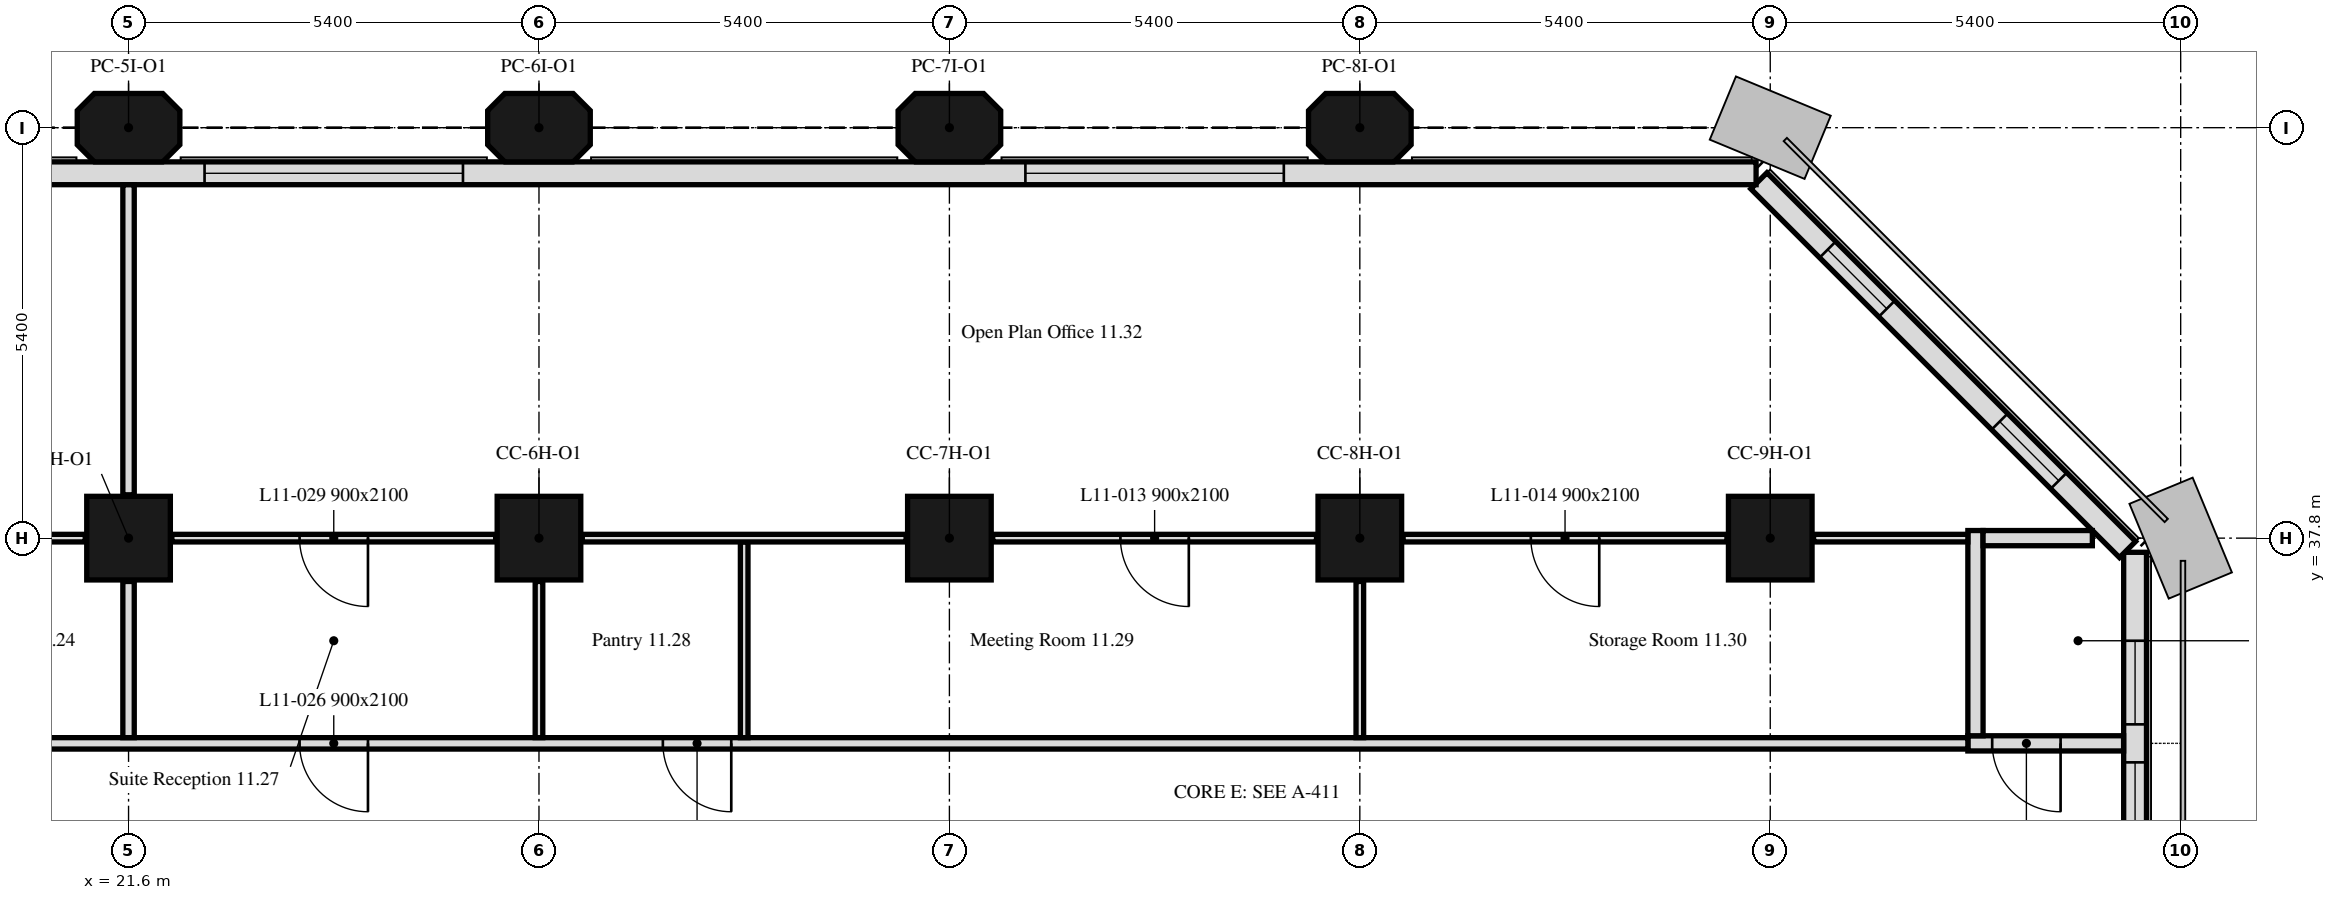
"""IFC4 building model, lengths in metres.
Left out: names, types, materials, properties, quantities, classifications, styles, units other than length and angle.
Written with IfcOpenShell. Run it as: python <this file> out.ifc"""

import sys

from ifc_helpers import new_model, si_unit, direction, frame, frame_2d, origin, origin_2d, place, context, subcontext, project, spatial, polyline, rectangle, outline, extrude, element, fill, save


model = new_model("IFC4")
c1 = context("Model", 3, precision=1e-05, world=origin(), true_north=direction((0.0, 1.0)))
c2 = subcontext(c1, "Body", "Model", "MODEL_VIEW")
j1 = project(units=[si_unit("LENGTHUNIT", "METRE"), si_unit("PLANEANGLEUNIT", "RADIAN")], contexts=[c1])
p1 = place(None, origin())
s1 = spatial("IfcSite", under=j1, at=p1, CompositionType="ELEMENT")
p2 = place(p1, origin())
s2 = spatial("IfcBuilding", under=s1, at=p2, CompositionType="ELEMENT")
p3 = place(p2, frame((0.0, 0.0, 52.6)))
s3 = spatial("IfcBuildingStorey", under=s2, at=p3, CompositionType="ELEMENT", Elevation=52.6)
for number, where, z_axis, x_axis in (
    (1, (21.6, 37.8, 0.0), (0.0, 0.0, 1.0), (1.0, 0.0, 0.0)),
    (2, (27.0, 37.8, 0.0), (0.0, 0.0, 1.0), (1.0, 0.0, 0.0)),
    (3, (32.4, 37.8, 0.0), (0.0, 0.0, 1.0), (1.0, 0.0, 0.0)),
    (4, (37.8, 37.8, 0.0), (0.0, 0.0, 1.0), (1.0, 0.0, 0.0)),
    (5, (43.2, 37.8, 0.0), (0.0, 0.0, 1.0), (1.0, 0.0, 0.0)),
):
    element("IfcColumn", number, at=place(p3, frame(where, z_axis=z_axis, x_axis=x_axis)), inside=s3, PredefinedType="COLUMN", context=c2, shape_type="SweptSolid", body=[
        extrude(rectangle(XDim=1.1, YDim=1.1, at=origin_2d()), origin(), (0.0, 0.0, 1.0), 3.5),
    ])
for number, where, z_axis, x_axis in (
    (6, (21.6, 43.2, 0.0), (0.0, 0.0, 1.0), (1.0, 0.0, 0.0)),
    (7, (27.0, 43.2, 0.0), (0.0, 0.0, 1.0), (1.0, 0.0, 0.0)),
    (8, (32.4, 43.2, 0.0), (0.0, 0.0, 1.0), (1.0, 0.0, 0.0)),
    (9, (37.8, 43.2, 0.0), (0.0, 0.0, 1.0), (1.0, 0.0, 0.0)),
):
    element("IfcColumn", number, at=place(p3, frame(where, z_axis=z_axis, x_axis=x_axis)), inside=s3, PredefinedType="COLUMN", context=c2, shape_type="SweptSolid", body=[
        extrude(outline(polyline([(-0.45, -0.45), (0.45, -0.45), (0.675, -0.225), (0.675, 0.225), (0.45, 0.45), (-0.45, 0.45), (-0.675, 0.225), (-0.675, -0.225), (-0.45, -0.45)])), origin(), (0.0, 0.0, 1.0), 3.5),
    ])
p4 = place(p3, frame((48.0, 5.586, 0.0), z_axis=(0.0, 0.0, 1.0), x_axis=(0.0, 1.0, 0.0)))
e10 = element("IfcWall", 10, at=p4, inside=s3, PredefinedType="SOLIDWALL", context=c2, shape_type="SweptSolid", body=[
    extrude(rectangle(XDim=32.027, YDim=0.3, at=frame_2d((16.014, 0.0))), origin(), (0.0, 0.0, 1.0), 3.5),
])
p5 = place(p4, frame((6.564, 0.0, 0.9)))
e11 = element("IfcOpeningElement", 11, at=p5, cuts=e10, PredefinedType="OPENING", context=c2, shape_type="SweptSolid", body=[
    extrude(rectangle(XDim=1.1, YDim=1.7, at=frame_2d((0.55, 0.85))), frame((0.0, 0.16, 0.0), z_axis=(0.0, -1.0, 0.0), x_axis=(1.0, 0.0, 0.0)), (0.0, 0.0, 1.0), 0.32),
])
p6 = place(p4, frame((8.164, 0.0, 0.9)))
e12 = element("IfcOpeningElement", 12, at=p6, cuts=e10, PredefinedType="OPENING", context=c2, shape_type="SweptSolid", body=[
    extrude(rectangle(XDim=1.1, YDim=1.7, at=frame_2d((0.55, 0.85))), frame((0.0, 0.16, 0.0), z_axis=(0.0, -1.0, 0.0), x_axis=(1.0, 0.0, 0.0)), (0.0, 0.0, 1.0), 0.32),
])
p7 = place(p4, frame((17.014, 0.0, 0.9)))
e13 = element("IfcOpeningElement", 13, at=p7, cuts=e10, PredefinedType="OPENING", context=c2, shape_type="SweptSolid", body=[
    extrude(rectangle(XDim=3.4, YDim=1.7, at=frame_2d((1.7, 0.85))), frame((0.0, 0.16, 0.0), z_axis=(0.0, -1.0, 0.0), x_axis=(1.0, 0.0, 0.0)), (0.0, 0.0, 1.0), 0.32),
])
p8 = place(p4, frame((28.164, 0.0, 0.9)))
e14 = element("IfcOpeningElement", 14, at=p8, cuts=e10, PredefinedType="OPENING", context=c2, shape_type="SweptSolid", body=[
    extrude(rectangle(XDim=1.1, YDim=1.7, at=frame_2d((0.55, 0.85))), frame((0.0, 0.16, 0.0), z_axis=(0.0, -1.0, 0.0), x_axis=(1.0, 0.0, 0.0)), (0.0, 0.0, 1.0), 0.32),
])
p9 = place(p4, frame((29.764, 0.0, 0.9)))
e15 = element("IfcOpeningElement", 15, at=p9, cuts=e10, PredefinedType="OPENING", context=c2, shape_type="SweptSolid", body=[
    extrude(rectangle(XDim=1.1, YDim=1.7, at=frame_2d((0.55, 0.85))), frame((0.0, 0.16, 0.0), z_axis=(0.0, -1.0, 0.0), x_axis=(1.0, 0.0, 0.0)), (0.0, 0.0, 1.0), 0.32),
])
p10 = place(p3, frame((47.901, 37.65, 0.0), z_axis=(0.0, 0.0, 1.0), x_axis=(-0.707106781187, 0.707106781187, 0.0)))
e16 = element("IfcWall", 16, at=p10, inside=s3, PredefinedType="SOLIDWALL", context=c2, shape_type="SweptSolid", body=[
    extrude(rectangle(XDim=6.86, YDim=0.3, at=frame_2d((3.43, 0.0))), origin(), (0.0, 0.0, 1.0), 3.5),
])
p11 = place(p10, frame((1.28, 0.0, 0.9)))
e17 = element("IfcOpeningElement", 17, at=p11, cuts=e16, PredefinedType="OPENING", context=c2, shape_type="SweptSolid", body=[
    extrude(rectangle(XDim=1.1, YDim=1.7, at=frame_2d((0.55, 0.85))), frame((0.0, 0.16, 0.0), z_axis=(0.0, -1.0, 0.0), x_axis=(1.0, 0.0, 0.0)), (0.0, 0.0, 1.0), 0.32),
])
p12 = place(p10, frame((4.48, 0.0, 0.9)))
e18 = element("IfcOpeningElement", 18, at=p12, cuts=e16, PredefinedType="OPENING", context=c2, shape_type="SweptSolid", body=[
    extrude(rectangle(XDim=1.1, YDim=1.7, at=frame_2d((0.55, 0.85))), frame((0.0, 0.16, 0.0), z_axis=(0.0, -1.0, 0.0), x_axis=(1.0, 0.0, 0.0)), (0.0, 0.0, 1.0), 0.32),
])
p13 = place(p3, frame((43.014, 42.6, 0.0), z_axis=(0.0, 0.0, 1.0), x_axis=(-1.0, 0.0, 0.0)))
e19 = element("IfcWall", 19, at=p13, inside=s3, PredefinedType="SOLIDWALL", context=c2, shape_type="SweptSolid", body=[
    extrude(rectangle(XDim=32.027, YDim=0.3, at=frame_2d((16.014, 0.0))), origin(), (0.0, 0.0, 1.0), 3.5),
])
p14 = place(p13, frame((6.214, 0.0, 0.9)))
e20 = element("IfcOpeningElement", 20, at=p14, cuts=e19, PredefinedType="OPENING", context=c2, shape_type="SweptSolid", body=[
    extrude(rectangle(XDim=3.4, YDim=1.7, at=frame_2d((1.7, 0.85))), frame((0.0, 0.16, 0.0), z_axis=(0.0, -1.0, 0.0), x_axis=(1.0, 0.0, 0.0)), (0.0, 0.0, 1.0), 0.32),
])
p15 = place(p13, frame((17.014, 0.0, 0.9)))
e21 = element("IfcOpeningElement", 21, at=p15, cuts=e19, PredefinedType="OPENING", context=c2, shape_type="SweptSolid", body=[
    extrude(rectangle(XDim=3.4, YDim=1.7, at=frame_2d((1.7, 0.85))), frame((0.0, 0.16, 0.0), z_axis=(0.0, -1.0, 0.0), x_axis=(1.0, 0.0, 0.0)), (0.0, 0.0, 1.0), 0.32),
])
p16 = place(p13, frame((27.814, 0.0, 0.9)))
e22 = element("IfcOpeningElement", 22, at=p16, cuts=e19, PredefinedType="OPENING", context=c2, shape_type="SweptSolid", body=[
    extrude(rectangle(XDim=3.4, YDim=1.7, at=frame_2d((1.7, 0.85))), frame((0.0, 0.16, 0.0), z_axis=(0.0, -1.0, 0.0), x_axis=(1.0, 0.0, 0.0)), (0.0, 0.0, 1.0), 0.32),
])
p17 = place(p3, frame((47.849, 35.1, 0.0), z_axis=(0.0, 0.0, 1.0), x_axis=(-1.0, 0.0, 0.0)))
e23 = element("IfcWall", 23, at=p17, inside=s3, PredefinedType="PARTITIONING", context=c2, shape_type="SweptSolid", body=[
    extrude(rectangle(XDim=2.049, YDim=0.2, at=frame_2d((1.024, 0.0))), origin(), (0.0, 0.0, 1.0), 3.5),
])
p18 = place(p17, frame((0.829, 0.0, 0.0)))
e24 = element("IfcOpeningElement", 24, at=p18, cuts=e23, PredefinedType="OPENING", context=c2, shape_type="SweptSolid", body=[
    extrude(rectangle(XDim=0.9, YDim=2.1, at=frame_2d((0.45, 1.05))), frame((0.0, 0.1, 0.0), z_axis=(0.0, -1.0, 0.0), x_axis=(1.0, 0.0, 0.0)), (0.0, 0.0, 1.0), 0.2),
])
p19 = place(p3, frame((45.8, 35.1, 0.0), z_axis=(0.0, 0.0, 1.0), x_axis=(-1.0, 0.0, 0.0)))
e25 = element("IfcWall", 25, at=p19, inside=s3, PredefinedType="PARTITIONING", context=c2, shape_type="SweptSolid", body=[
    extrude(rectangle(XDim=39.649, YDim=0.15, at=frame_2d((19.825, 0.0))), origin(), (0.0, 0.0, 1.0), 3.5),
])
p20 = place(p19, frame((37.87, 0.0, 0.0)))
e26 = element("IfcOpeningElement", 26, at=p20, cuts=e25, PredefinedType="OPENING", context=c2, shape_type="SweptSolid", body=[
    extrude(rectangle(XDim=0.9, YDim=2.1, at=frame_2d((0.45, 1.05))), frame((0.0, 0.075, 0.0), z_axis=(0.0, -1.0, 0.0), x_axis=(1.0, 0.0, 0.0)), (0.0, 0.0, 1.0), 0.15),
])
p21 = place(p19, frame((36.575, 0.0, 0.0)))
e27 = element("IfcOpeningElement", 27, at=p21, cuts=e25, PredefinedType="OPENING", context=c2, shape_type="SweptSolid", body=[
    extrude(rectangle(XDim=0.9, YDim=2.1, at=frame_2d((0.45, 1.05))), frame((0.0, 0.075, 0.0), z_axis=(0.0, -1.0, 0.0), x_axis=(1.0, 0.0, 0.0)), (0.0, 0.0, 1.0), 0.15),
])
p22 = place(p19, frame((32.47, 0.0, 0.0)))
e28 = element("IfcOpeningElement", 28, at=p22, cuts=e25, PredefinedType="OPENING", context=c2, shape_type="SweptSolid", body=[
    extrude(rectangle(XDim=0.9, YDim=2.1, at=frame_2d((0.45, 1.05))), frame((0.0, 0.075, 0.0), z_axis=(0.0, -1.0, 0.0), x_axis=(1.0, 0.0, 0.0)), (0.0, 0.0, 1.0), 0.15),
])
p23 = place(p19, frame((16.27, 0.0, 0.0)))
e29 = element("IfcOpeningElement", 29, at=p23, cuts=e25, PredefinedType="OPENING", context=c2, shape_type="SweptSolid", body=[
    extrude(rectangle(XDim=0.9, YDim=2.1, at=frame_2d((0.45, 1.05))), frame((0.0, 0.075, 0.0), z_axis=(0.0, -1.0, 0.0), x_axis=(1.0, 0.0, 0.0)), (0.0, 0.0, 1.0), 0.15),
])
p24 = place(p19, frame((21.05, 0.0, 0.0)))
e30 = element("IfcOpeningElement", 30, at=p24, cuts=e25, PredefinedType="OPENING", context=c2, shape_type="SweptSolid", body=[
    extrude(rectangle(XDim=0.9, YDim=2.1, at=frame_2d((0.45, 1.05))), frame((0.0, 0.075, 0.0), z_axis=(0.0, -1.0, 0.0), x_axis=(1.0, 0.0, 0.0)), (0.0, 0.0, 1.0), 0.15),
])
p25 = place(p19, frame((31.23, 0.0, 0.0)))
e31 = element("IfcOpeningElement", 31, at=p25, cuts=e25, PredefinedType="OPENING", context=c2, shape_type="SweptSolid", body=[
    extrude(rectangle(XDim=0.9, YDim=2.1, at=frame_2d((0.45, 1.05))), frame((0.0, 0.075, 0.0), z_axis=(0.0, -1.0, 0.0), x_axis=(1.0, 0.0, 0.0)), (0.0, 0.0, 1.0), 0.15),
])
p26 = place(p3, frame((21.6, 35.175, 0.0), z_axis=(0.0, 0.0, 1.0), x_axis=(0.0, 1.0, 0.0)))
e32 = element("IfcWall", 32, at=p26, inside=s3, PredefinedType="PARTITIONING", context=c2, shape_type="SweptSolid", body=[
    extrude(rectangle(XDim=2.055, YDim=0.15, at=frame_2d((1.027, 0.0))), origin(), (0.0, 0.0, 1.0), 3.5),
])
p27 = place(p3, frame((21.03, 37.8, 0.0), z_axis=(0.0, 0.0, 1.0), x_axis=(-1.0, 0.0, 0.0)))
e33 = element("IfcWall", 33, at=p27, inside=s3, PredefinedType="PARTITIONING", context=c2, shape_type="SweptSolid", body=[
    extrude(rectangle(XDim=4.26, YDim=0.1, at=frame_2d((2.13, 0.0))), origin(), (0.0, 0.0, 1.0), 3.5),
])
p28 = place(p3, frame((21.6, 38.37, 0.0), z_axis=(0.0, 0.0, 1.0), x_axis=(0.0, 1.0, 0.0)))
e34 = element("IfcWall", 34, at=p28, inside=s3, PredefinedType="PARTITIONING", context=c2, shape_type="SweptSolid", body=[
    extrude(rectangle(XDim=4.079, YDim=0.15, at=frame_2d((2.04, 0.0))), origin(), (0.0, 0.0, 1.0), 3.5),
])
p29 = place(p3, frame((27.0, 35.175, 0.0), z_axis=(0.0, 0.0, 1.0), x_axis=(0.0, 1.0, 0.0)))
e35 = element("IfcWall", 35, at=p29, inside=s3, PredefinedType="PARTITIONING", context=c2, shape_type="SweptSolid", body=[
    extrude(rectangle(XDim=2.055, YDim=0.1, at=frame_2d((1.027, 0.0))), origin(), (0.0, 0.0, 1.0), 3.5),
])
p30 = place(p3, frame((26.43, 37.8, 0.0), z_axis=(0.0, 0.0, 1.0), x_axis=(-1.0, 0.0, 0.0)))
e36 = element("IfcWall", 36, at=p30, inside=s3, PredefinedType="PARTITIONING", context=c2, shape_type="SweptSolid", body=[
    extrude(rectangle(XDim=4.26, YDim=0.1, at=frame_2d((2.13, 0.0))), origin(), (0.0, 0.0, 1.0), 3.5),
])
p31 = place(p30, frame((1.68, 0.0, 0.0)))
e37 = element("IfcOpeningElement", 37, at=p31, cuts=e36, PredefinedType="OPENING", context=c2, shape_type="SweptSolid", body=[
    extrude(rectangle(XDim=0.9, YDim=2.1, at=frame_2d((0.45, 1.05))), frame((0.0, 0.05, 0.0), z_axis=(0.0, -1.0, 0.0), x_axis=(1.0, 0.0, 0.0)), (0.0, 0.0, 1.0), 0.1),
])
p32 = place(p3, frame((29.7, 35.175, 0.0), z_axis=(0.0, 0.0, 1.0), x_axis=(0.0, 1.0, 0.0)))
e38 = element("IfcWall", 38, at=p32, inside=s3, PredefinedType="PARTITIONING", context=c2, shape_type="SweptSolid", body=[
    extrude(rectangle(XDim=2.575, YDim=0.1, at=frame_2d((1.288, 0.0))), origin(), (0.0, 0.0, 1.0), 3.5),
])
p33 = place(p3, frame((37.8, 35.175, 0.0), z_axis=(0.0, 0.0, 1.0), x_axis=(0.0, 1.0, 0.0)))
e39 = element("IfcWall", 39, at=p33, inside=s3, PredefinedType="PARTITIONING", context=c2, shape_type="SweptSolid", body=[
    extrude(rectangle(XDim=2.055, YDim=0.1, at=frame_2d((1.027, 0.0))), origin(), (0.0, 0.0, 1.0), 3.5),
])
p34 = place(p3, frame((37.23, 37.8, 0.0), z_axis=(0.0, 0.0, 1.0), x_axis=(-1.0, 0.0, 0.0)))
e40 = element("IfcWall", 40, at=p34, inside=s3, PredefinedType="PARTITIONING", context=c2, shape_type="SweptSolid", body=[
    extrude(rectangle(XDim=4.26, YDim=0.1, at=frame_2d((2.13, 0.0))), origin(), (0.0, 0.0, 1.0), 3.5),
])
p35 = place(p34, frame((1.68, 0.0, 0.0)))
e41 = element("IfcOpeningElement", 41, at=p35, cuts=e40, PredefinedType="OPENING", context=c2, shape_type="SweptSolid", body=[
    extrude(rectangle(XDim=0.9, YDim=2.1, at=frame_2d((0.45, 1.05))), frame((0.0, 0.05, 0.0), z_axis=(0.0, -1.0, 0.0), x_axis=(1.0, 0.0, 0.0)), (0.0, 0.0, 1.0), 0.1),
])
p36 = place(p3, frame((31.83, 37.8, 0.0), z_axis=(0.0, 0.0, 1.0), x_axis=(-1.0, 0.0, 0.0)))
e42 = element("IfcWall", 42, at=p36, inside=s3, PredefinedType="PARTITIONING", context=c2, shape_type="SweptSolid", body=[
    extrude(rectangle(XDim=4.26, YDim=0.1, at=frame_2d((2.13, 0.0))), origin(), (0.0, 0.0, 1.0), 3.5),
])
p37 = place(p3, frame((45.9, 35.2, 0.0), z_axis=(0.0, 0.0, 1.0), x_axis=(0.0, 1.0, 0.0)))
e43 = element("IfcWall", 43, at=p37, inside=s3, PredefinedType="PARTITIONING", context=c2, shape_type="SweptSolid", body=[
    extrude(rectangle(XDim=2.7, YDim=0.2, at=frame_2d((1.35, 0.0))), origin(), (0.0, 0.0, 1.0), 3.5),
])
p38 = place(p3, frame((45.8, 37.8, 0.0), z_axis=(0.0, 0.0, 1.0), x_axis=(-1.0, 0.0, 0.0)))
e44 = element("IfcWall", 44, at=p38, inside=s3, PredefinedType="PARTITIONING", context=c2, shape_type="SweptSolid", body=[
    extrude(rectangle(XDim=2.03, YDim=0.1, at=frame_2d((1.015, 0.0))), origin(), (0.0, 0.0, 1.0), 3.5),
])
p39 = place(p3, frame((42.63, 37.8, 0.0), z_axis=(0.0, 0.0, 1.0), x_axis=(-1.0, 0.0, 0.0)))
e45 = element("IfcWall", 45, at=p39, inside=s3, PredefinedType="PARTITIONING", context=c2, shape_type="SweptSolid", body=[
    extrude(rectangle(XDim=4.26, YDim=0.1, at=frame_2d((2.13, 0.0))), origin(), (0.0, 0.0, 1.0), 3.5),
])
p40 = place(p39, frame((1.68, 0.0, 0.0)))
e46 = element("IfcOpeningElement", 46, at=p40, cuts=e45, PredefinedType="OPENING", context=c2, shape_type="SweptSolid", body=[
    extrude(rectangle(XDim=0.9, YDim=2.1, at=frame_2d((0.45, 1.05))), frame((0.0, 0.05, 0.0), z_axis=(0.0, -1.0, 0.0), x_axis=(1.0, 0.0, 0.0)), (0.0, 0.0, 1.0), 0.1),
])
p41 = place(p3, frame((47.438, 37.8, 0.0), z_axis=(0.0, 0.0, 1.0), x_axis=(-1.0, 0.0, 0.0)))
e47 = element("IfcWall", 47, at=p41, inside=s3, PredefinedType="PARTITIONING", context=c2, shape_type="SweptSolid", body=[
    extrude(rectangle(XDim=1.438, YDim=0.2, at=frame_2d((0.719, 0.0))), origin(), (0.0, 0.0, 1.0), 3.5),
])
p42 = place(p8, origin())
e48 = element("IfcWindow", 48, at=p42, inside=s3, PartitioningType="SINGLE_PANEL", PredefinedType="WINDOW", context=c2, shape_type="SweptSolid", body=[
    extrude(rectangle(XDim=1.1, YDim=1.7, at=frame_2d((0.55, 0.85))), frame((0.0, 0.03, 0.0), z_axis=(0.0, -1.0, 0.0), x_axis=(1.0, 0.0, 0.0)), (0.0, 0.0, 1.0), 0.06),
])
fill(e14, e48)
p43 = place(p9, origin())
e49 = element("IfcWindow", 49, at=p43, inside=s3, PartitioningType="SINGLE_PANEL", PredefinedType="WINDOW", context=c2, shape_type="SweptSolid", body=[
    extrude(rectangle(XDim=1.1, YDim=1.7, at=frame_2d((0.55, 0.85))), frame((0.0, 0.03, 0.0), z_axis=(0.0, -1.0, 0.0), x_axis=(1.0, 0.0, 0.0)), (0.0, 0.0, 1.0), 0.06),
])
fill(e15, e49)
p44 = place(p11, origin())
e50 = element("IfcWindow", 50, at=p44, inside=s3, PartitioningType="SINGLE_PANEL", PredefinedType="WINDOW", context=c2, shape_type="SweptSolid", body=[
    extrude(rectangle(XDim=1.1, YDim=1.7, at=frame_2d((0.55, 0.85))), frame((0.0, 0.03, 0.0), z_axis=(0.0, -1.0, 0.0), x_axis=(1.0, 0.0, 0.0)), (0.0, 0.0, 1.0), 0.06),
])
fill(e17, e50)
p45 = place(p12, origin())
e51 = element("IfcWindow", 51, at=p45, inside=s3, PartitioningType="SINGLE_PANEL", PredefinedType="WINDOW", context=c2, shape_type="SweptSolid", body=[
    extrude(rectangle(XDim=1.1, YDim=1.7, at=frame_2d((0.55, 0.85))), frame((0.0, 0.03, 0.0), z_axis=(0.0, -1.0, 0.0), x_axis=(1.0, 0.0, 0.0)), (0.0, 0.0, 1.0), 0.06),
])
fill(e18, e51)
p46 = place(p14, origin())
e52 = element("IfcWindow", 52, at=p46, inside=s3, PartitioningType="SINGLE_PANEL", PredefinedType="WINDOW", context=c2, shape_type="SweptSolid", body=[
    extrude(rectangle(XDim=3.4, YDim=1.7, at=frame_2d((1.7, 0.85))), frame((0.0, 0.03, 0.0), z_axis=(0.0, -1.0, 0.0), x_axis=(1.0, 0.0, 0.0)), (0.0, 0.0, 1.0), 0.06),
])
fill(e20, e52)
p47 = place(p15, origin())
e53 = element("IfcWindow", 53, at=p47, inside=s3, PartitioningType="SINGLE_PANEL", PredefinedType="WINDOW", context=c2, shape_type="SweptSolid", body=[
    extrude(rectangle(XDim=3.4, YDim=1.7, at=frame_2d((1.7, 0.85))), frame((0.0, 0.03, 0.0), z_axis=(0.0, -1.0, 0.0), x_axis=(1.0, 0.0, 0.0)), (0.0, 0.0, 1.0), 0.06),
])
fill(e21, e53)
p48 = place(p23, origin())
e54 = element("IfcDoor", 54, at=p48, inside=s3, OperationType="SINGLE_SWING_RIGHT", PredefinedType="DOOR", context=c2, shape_type="SweptSolid", body=[
    extrude(rectangle(XDim=0.9, YDim=2.1, at=frame_2d((0.45, 1.05))), frame((0.0, 0.025, 0.0), z_axis=(0.0, -1.0, 0.0), x_axis=(1.0, 0.0, 0.0)), (0.0, 0.0, 1.0), 0.05),
])
fill(e29, e54)
p49 = place(p18, origin())
e55 = element("IfcDoor", 55, at=p49, inside=s3, OperationType="SINGLE_SWING_LEFT", PredefinedType="DOOR", context=c2, shape_type="SweptSolid", body=[
    extrude(rectangle(XDim=0.9, YDim=2.1, at=frame_2d((0.45, 1.05))), frame((0.0, 0.025, 0.0), z_axis=(0.0, -1.0, 0.0), x_axis=(1.0, 0.0, 0.0)), (0.0, 0.0, 1.0), 0.05),
])
fill(e24, e55)
p50 = place(p35, origin())
e56 = element("IfcDoor", 56, at=p50, inside=s3, OperationType="SINGLE_SWING_LEFT", PredefinedType="DOOR", context=c2, shape_type="SweptSolid", body=[
    extrude(rectangle(XDim=0.9, YDim=2.1, at=frame_2d((0.45, 1.05))), frame((0.0, 0.025, 0.0), z_axis=(0.0, -1.0, 0.0), x_axis=(1.0, 0.0, 0.0)), (0.0, 0.0, 1.0), 0.05),
])
fill(e41, e56)
p51 = place(p40, origin())
e57 = element("IfcDoor", 57, at=p51, inside=s3, OperationType="SINGLE_SWING_RIGHT", PredefinedType="DOOR", context=c2, shape_type="SweptSolid", body=[
    extrude(rectangle(XDim=0.9, YDim=2.1, at=frame_2d((0.45, 1.05))), frame((0.0, 0.025, 0.0), z_axis=(0.0, -1.0, 0.0), x_axis=(1.0, 0.0, 0.0)), (0.0, 0.0, 1.0), 0.05),
])
fill(e46, e57)
p52 = place(p24, origin())
e58 = element("IfcDoor", 58, at=p52, inside=s3, OperationType="SINGLE_SWING_RIGHT", PredefinedType="DOOR", context=c2, shape_type="SweptSolid", body=[
    extrude(rectangle(XDim=0.9, YDim=2.1, at=frame_2d((0.45, 1.05))), frame((0.0, 0.025, 0.0), z_axis=(0.0, -1.0, 0.0), x_axis=(1.0, 0.0, 0.0)), (0.0, 0.0, 1.0), 0.05),
])
fill(e30, e58)
p53 = place(p31, origin())
e59 = element("IfcDoor", 59, at=p53, inside=s3, OperationType="SINGLE_SWING_RIGHT", PredefinedType="DOOR", context=c2, shape_type="SweptSolid", body=[
    extrude(rectangle(XDim=0.9, YDim=2.1, at=frame_2d((0.45, 1.05))), frame((0.0, 0.025, 0.0), z_axis=(0.0, -1.0, 0.0), x_axis=(1.0, 0.0, 0.0)), (0.0, 0.0, 1.0), 0.05),
])
fill(e37, e59)
save(model, sys.argv[1])
